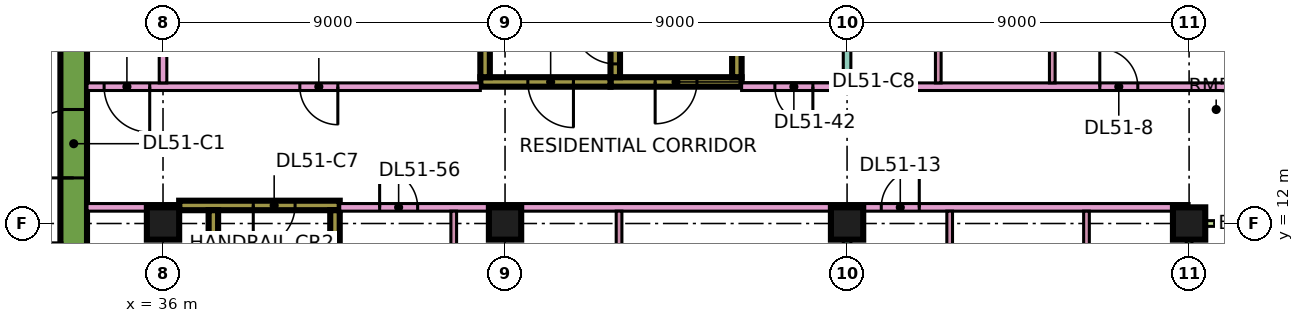
"""IFC4 building model, lengths in metres.
Left out: names, types, materials, properties, quantities, classifications, styles, units other than length and angle.
Written with IfcOpenShell. Run it as: python <this file> out.ifc"""

import sys

from ifc_helpers import new_model, si_unit, direction, frame, frame_2d, origin, origin_2d, place, context, subcontext, project, spatial, rectangle, extrude, element, fill, save


model = new_model("IFC4")
c1 = context("Model", 3, precision=1e-05, world=origin(), true_north=direction((0.0, 1.0)))
c2 = subcontext(c1, "Body", "Model", "MODEL_VIEW")
j1 = project(units=[si_unit("LENGTHUNIT", "METRE"), si_unit("PLANEANGLEUNIT", "RADIAN")], contexts=[c1])
p1 = place(None, origin())
s1 = spatial("IfcSite", under=j1, at=p1, CompositionType="ELEMENT")
p2 = place(p1, origin())
s2 = spatial("IfcBuilding", under=s1, at=p2, CompositionType="ELEMENT")
p3 = place(p2, frame((0.0, 0.0, 219.15)))
s3 = spatial("IfcBuildingStorey", under=s2, at=p3, CompositionType="ELEMENT", Elevation=219.15)
for number, where, z_axis, x_axis in (
    (1, (36.0, 12.0, 0.0), (0.0, 0.0, 1.0), (1.0, 0.0, 0.0)),
    (2, (45.0, 12.0, 0.0), (0.0, 0.0, 1.0), (1.0, 0.0, 0.0)),
    (3, (54.0, 12.0, 0.0), (0.0, 0.0, 1.0), (1.0, 0.0, 0.0)),
    (4, (63.0, 12.0, 0.0), (0.0, 0.0, 1.0), (1.0, 0.0, 0.0)),
):
    element("IfcColumn", number, at=place(p3, frame(where, z_axis=z_axis, x_axis=x_axis)), inside=s3, PredefinedType="COLUMN", context=c2, shape_type="SweptSolid", body=[
        extrude(rectangle(XDim=0.85, YDim=0.85, at=origin_2d()), origin(), (0.0, 0.0, 1.0), 3.75),
    ])
p4 = place(p3, frame((33.65, 7.7, 0.0), z_axis=(0.0, 0.0, 1.0), x_axis=(0.0, 1.0, 0.0)))
e5 = element("IfcWall", 5, at=p4, inside=s3, PredefinedType="SHEAR", context=c2, shape_type="SweptSolid", body=[
    extrude(rectangle(XDim=11.6, YDim=0.7, at=frame_2d((5.8, 0.0))), origin(), (0.0, 0.0, 1.0), 3.75),
])
p5 = place(p4, frame((5.5, 0.0, 0.0)))
e6 = element("IfcOpeningElement", 6, at=p5, cuts=e5, PredefinedType="OPENING", context=c2, shape_type="SweptSolid", body=[
    extrude(rectangle(XDim=1.8, YDim=2.4, at=frame_2d((0.9, 1.2))), frame((0.0, 0.36, 0.0), z_axis=(0.0, -1.0, 0.0), x_axis=(1.0, 0.0, 0.0)), (0.0, 0.0, 1.0), 0.72),
])
p6 = place(p3, frame((36.425, 12.475, 0.0), z_axis=(0.0, 0.0, 1.0), x_axis=(1.0, 0.0, 0.0)))
e7 = element("IfcWall", 7, at=p6, inside=s3, PredefinedType="SHEAR", context=c2, shape_type="SweptSolid", body=[
    extrude(rectangle(XDim=4.225, YDim=0.25, at=frame_2d((2.112, 0.0))), origin(), (0.0, 0.0, 1.0), 3.75),
])
p7 = place(p6, frame((1.95, 0.0, 0.0)))
e8 = element("IfcOpeningElement", 8, at=p7, cuts=e7, PredefinedType="OPENING", context=c2, shape_type="SweptSolid", body=[
    extrude(rectangle(XDim=1.1, YDim=2.2, at=frame_2d((0.55, 1.1))), frame((0.0, 0.135, 0.0), z_axis=(0.0, -1.0, 0.0), x_axis=(1.0, 0.0, 0.0)), (0.0, 0.0, 1.0), 0.27),
])
for number, where, z_axis, x_axis in (
    (9, (37.325, 5.85, 0.0), (0.0, 0.0, 1.0), (0.0, 1.0, 0.0)),
    (10, (40.525, 5.85, 0.0), (0.0, 0.0, 1.0), (0.0, 1.0, 0.0)),
):
    element("IfcWall", number, at=place(p3, frame(where, z_axis=z_axis, x_axis=x_axis)), inside=s3, PredefinedType="SHEAR", context=c2, shape_type="SweptSolid", body=[
        extrude(rectangle(XDim=6.5, YDim=0.25, at=frame_2d((3.25, 0.0))), origin(), (0.0, 0.0, 1.0), 3.75),
    ])
p8 = place(p3, frame((47.775, 15.725, 0.0), z_axis=(0.0, 0.0, 1.0), x_axis=(1.0, 0.0, 0.0)))
e11 = element("IfcWall", 11, at=p8, inside=s3, PredefinedType="SHEAR", context=c2, shape_type="SweptSolid", body=[
    extrude(rectangle(XDim=3.45, YDim=0.25, at=frame_2d((1.725, 0.0))), origin(), (0.0, 0.0, 1.0), 3.75),
])
p9 = place(p8, frame((1.175, 0.0, 0.0)))
e12 = element("IfcOpeningElement", 12, at=p9, cuts=e11, PredefinedType="OPENING", context=c2, shape_type="SweptSolid", body=[
    extrude(rectangle(XDim=1.1, YDim=2.2, at=frame_2d((0.55, 1.1))), frame((0.0, 0.135, 0.0), z_axis=(0.0, -1.0, 0.0), x_axis=(1.0, 0.0, 0.0)), (0.0, 0.0, 1.0), 0.27),
])
p10 = place(p3, frame((47.9, 15.85, 0.0), z_axis=(0.0, 0.0, 1.0), x_axis=(0.0, 1.0, 0.0)))
e13 = element("IfcWall", 13, at=p10, inside=s3, PredefinedType="SHEAR", context=c2, shape_type="SweptSolid", body=[
    extrude(rectangle(XDim=6.5, YDim=0.25, at=frame_2d((3.25, 0.0))), origin(), (0.0, 0.0, 1.0), 3.75),
])
p11 = place(p10, frame((0.35, 0.0, 0.0)))
e14 = element("IfcOpeningElement", 14, at=p11, cuts=e13, PredefinedType="OPENING", context=c2, shape_type="SweptSolid", body=[
    extrude(rectangle(XDim=1.1, YDim=2.2, at=frame_2d((0.55, 1.1))), frame((0.0, 0.135, 0.0), z_axis=(0.0, -1.0, 0.0), x_axis=(1.0, 0.0, 0.0)), (0.0, 0.0, 1.0), 0.27),
])
p12 = place(p3, frame((51.1, 15.85, 0.0), z_axis=(0.0, 0.0, 1.0), x_axis=(0.0, 1.0, 0.0)))
e15 = element("IfcWall", 15, at=p12, inside=s3, PredefinedType="SHEAR", context=c2, shape_type="SweptSolid", body=[
    extrude(rectangle(XDim=6.5, YDim=0.25, at=frame_2d((3.25, 0.0))), origin(), (0.0, 0.0, 1.0), 3.75),
])
p13 = place(p3, frame((44.35, 15.725, 0.0), z_axis=(0.0, 0.0, 1.0), x_axis=(1.0, 0.0, 0.0)))
e16 = element("IfcWall", 16, at=p13, inside=s3, PredefinedType="SHEAR", context=c2, shape_type="SweptSolid", body=[
    extrude(rectangle(XDim=3.425, YDim=0.25, at=frame_2d((1.712, 0.0))), origin(), (0.0, 0.0, 1.0), 3.75),
])
p14 = place(p13, frame((1.25, 0.0, 0.0)))
e17 = element("IfcOpeningElement", 17, at=p14, cuts=e16, PredefinedType="OPENING", context=c2, shape_type="SweptSolid", body=[
    extrude(rectangle(XDim=1.2, YDim=2.2, at=frame_2d((0.6, 1.1))), frame((0.0, 0.135, 0.0), z_axis=(0.0, -1.0, 0.0), x_axis=(1.0, 0.0, 0.0)), (0.0, 0.0, 1.0), 0.27),
])
p15 = place(p3, frame((44.475, 15.85, 0.0), z_axis=(0.0, 0.0, 1.0), x_axis=(0.0, 1.0, 0.0)))
e18 = element("IfcWall", 18, at=p15, inside=s3, PredefinedType="SHEAR", context=c2, shape_type="SweptSolid", body=[
    extrude(rectangle(XDim=6.5, YDim=0.25, at=frame_2d((3.25, 0.0))), origin(), (0.0, 0.0, 1.0), 3.75),
])
p16 = place(p15, frame((1.75, 0.0, 0.0)))
e19 = element("IfcOpeningElement", 19, at=p16, cuts=e18, PredefinedType="OPENING", context=c2, shape_type="SweptSolid", body=[
    extrude(rectangle(XDim=1.1, YDim=2.2, at=frame_2d((0.55, 1.1))), frame((0.0, 0.135, 0.0), z_axis=(0.0, -1.0, 0.0), x_axis=(1.0, 0.0, 0.0)), (0.0, 0.0, 1.0), 0.27),
])
p17 = place(p15, frame((4.3, 0.0, 0.0)))
e20 = element("IfcOpeningElement", 20, at=p17, cuts=e18, PredefinedType="OPENING", context=c2, shape_type="SweptSolid", body=[
    extrude(rectangle(XDim=1.1, YDim=2.2, at=frame_2d((0.55, 1.1))), frame((0.0, 0.135, 0.0), z_axis=(0.0, -1.0, 0.0), x_axis=(1.0, 0.0, 0.0)), (0.0, 0.0, 1.0), 0.27),
])
p18 = place(p3, frame((63.0, 1.575, 0.0), z_axis=(0.0, 0.0, 1.0), x_axis=(0.0, 1.0, 0.0)))
e21 = element("IfcWall", 21, at=p18, inside=s3, PredefinedType="SOLIDWALL", context=c2, shape_type="SweptSolid", body=[
    extrude(rectangle(XDim=10.35, YDim=0.15, at=frame_2d((5.175, 0.0))), origin(), (0.0, 0.0, 1.0), 3.35),
])
p19 = place(p18, frame((1.825, 0.0, 0.0)))
e22 = element("IfcOpeningElement", 22, at=p19, cuts=e21, PredefinedType="OPENING", context=c2, shape_type="SweptSolid", body=[
    extrude(rectangle(XDim=1.8, YDim=2.4, at=frame_2d((0.9, 1.2))), frame((0.0, 0.085, 0.0), z_axis=(0.0, -1.0, 0.0), x_axis=(1.0, 0.0, 0.0)), (0.0, 0.0, 1.0), 0.17),
])
p20 = place(p18, frame((7.075, 0.0, 0.45)))
e23 = element("IfcOpeningElement", 23, at=p20, cuts=e21, PredefinedType="OPENING", context=c2, shape_type="SweptSolid", body=[
    extrude(rectangle(XDim=2.4, YDim=2.4, at=frame_2d((1.2, 1.2))), frame((0.0, 0.085, 0.0), z_axis=(0.0, -1.0, 0.0), x_axis=(1.0, 0.0, 0.0)), (0.0, 0.0, 1.0), 0.17),
])
p21 = place(p3, frame((64.5, 12.0, 0.0), z_axis=(0.0, 0.0, 1.0), x_axis=(-1.0, 0.0, 0.0)))
e24 = element("IfcWall", 24, at=p21, inside=s3, PredefinedType="SOLIDWALL", context=c2, shape_type="SweptSolid", body=[
    extrude(rectangle(XDim=1.5, YDim=0.15, at=frame_2d((0.75, 0.0))), origin(), (0.0, 0.0, 1.0), 3.35),
])
p22 = place(p3, frame((34.0, 12.425, 0.0), z_axis=(0.0, 0.0, 1.0), x_axis=(1.0, 0.0, 0.0)))
e25 = element("IfcWall", 25, at=p22, inside=s3, PredefinedType="PARTITIONING", context=c2, shape_type="SweptSolid", body=[
    extrude(rectangle(XDim=2.426, YDim=0.2, at=frame_2d((1.213, 0.0))), origin(), (0.0, 0.0, 1.0), 3.35),
])
p23 = place(p3, frame((34.0, 15.6, 0.0), z_axis=(0.0, 0.0, 1.0), x_axis=(1.0, 0.0, 0.0)))
e26 = element("IfcWall", 26, at=p23, inside=s3, PredefinedType="PARTITIONING", context=c2, shape_type="SweptSolid", body=[
    extrude(rectangle(XDim=10.35, YDim=0.2, at=frame_2d((5.175, 0.0))), origin(), (0.0, 0.0, 1.0), 3.35),
])
p24 = place(p23, frame((5.6, 0.0, 0.0)))
e27 = element("IfcOpeningElement", 27, at=p24, cuts=e26, PredefinedType="OPENING", context=c2, shape_type="SweptSolid", body=[
    extrude(rectangle(XDim=1.0, YDim=2.1, at=frame_2d((0.5, 1.05))), frame((0.0, 0.11, 0.0), z_axis=(0.0, -1.0, 0.0), x_axis=(1.0, 0.0, 0.0)), (0.0, 0.0, 1.0), 0.22),
])
p25 = place(p23, frame((0.45, 0.0, 0.0)))
e28 = element("IfcOpeningElement", 28, at=p25, cuts=e26, PredefinedType="OPENING", context=c2, shape_type="SweptSolid", body=[
    extrude(rectangle(XDim=1.2, YDim=2.1, at=frame_2d((0.6, 1.05))), frame((0.0, 0.11, 0.0), z_axis=(0.0, -1.0, 0.0), x_axis=(1.0, 0.0, 0.0)), (0.0, 0.0, 1.0), 0.22),
])
p26 = place(p3, frame((36.0, 15.7, 0.0), z_axis=(0.0, 0.0, 1.0), x_axis=(0.0, 1.0, 0.0)))
e29 = element("IfcWall", 29, at=p26, inside=s3, PredefinedType="PARTITIONING", context=c2, shape_type="SweptSolid", body=[
    extrude(rectangle(XDim=8.3, YDim=0.2, at=frame_2d((4.15, 0.0))), origin(), (0.0, 0.0, 1.0), 3.35),
])
p27 = place(p3, frame((40.65, 12.425, 0.0), z_axis=(0.0, 0.0, 1.0), x_axis=(1.0, 0.0, 0.0)))
e30 = element("IfcWall", 30, at=p27, inside=s3, PredefinedType="PARTITIONING", context=c2, shape_type="SweptSolid", body=[
    extrude(rectangle(XDim=22.35, YDim=0.2, at=frame_2d((11.175, 0.0))), origin(), (0.0, 0.0, 1.0), 3.35),
])
p28 = place(p27, frame((14.25, 0.0, 0.0)))
e31 = element("IfcOpeningElement", 31, at=p28, cuts=e30, PredefinedType="OPENING", context=c2, shape_type="SweptSolid", body=[
    extrude(rectangle(XDim=1.0, YDim=2.1, at=frame_2d((0.5, 1.05))), frame((0.0, 0.11, 0.0), z_axis=(0.0, -1.0, 0.0), x_axis=(1.0, 0.0, 0.0)), (0.0, 0.0, 1.0), 0.22),
])
p29 = place(p27, frame((1.05, 0.0, 0.0)))
e32 = element("IfcOpeningElement", 32, at=p29, cuts=e30, PredefinedType="OPENING", context=c2, shape_type="SweptSolid", body=[
    extrude(rectangle(XDim=1.0, YDim=2.1, at=frame_2d((0.5, 1.05))), frame((0.0, 0.11, 0.0), z_axis=(0.0, -1.0, 0.0), x_axis=(1.0, 0.0, 0.0)), (0.0, 0.0, 1.0), 0.22),
])
p30 = place(p3, frame((43.65, 5.975, 0.0), z_axis=(0.0, 0.0, 1.0), x_axis=(0.0, 1.0, 0.0)))
e33 = element("IfcWall", 33, at=p30, inside=s3, PredefinedType="PARTITIONING", context=c2, shape_type="SweptSolid", body=[
    extrude(rectangle(XDim=6.35, YDim=0.15, at=frame_2d((3.175, 0.0))), origin(), (0.0, 0.0, 1.0), 3.35),
])
p31 = place(p30, frame((4.275, 0.0, 0.0)))
e34 = element("IfcOpeningElement", 34, at=p31, cuts=e33, PredefinedType="OPENING", context=c2, shape_type="SweptSolid", body=[
    extrude(rectangle(XDim=0.9, YDim=2.1, at=frame_2d((0.45, 1.05))), frame((0.0, 0.085, 0.0), z_axis=(0.0, -1.0, 0.0), x_axis=(1.0, 0.0, 0.0)), (0.0, 0.0, 1.0), 0.17),
])
p32 = place(p3, frame((48.0, 5.975, 0.0), z_axis=(0.0, 0.0, 1.0), x_axis=(0.0, 1.0, 0.0)))
e35 = element("IfcWall", 35, at=p32, inside=s3, PredefinedType="PARTITIONING", context=c2, shape_type="SweptSolid", body=[
    extrude(rectangle(XDim=6.35, YDim=0.15, at=frame_2d((3.175, 0.0))), origin(), (0.0, 0.0, 1.0), 3.35),
])
p33 = place(p3, frame((51.225, 15.6, 0.0), z_axis=(0.0, 0.0, 1.0), x_axis=(1.0, 0.0, 0.0)))
e36 = element("IfcWall", 36, at=p33, inside=s3, PredefinedType="PARTITIONING", context=c2, shape_type="SweptSolid", body=[
    extrude(rectangle(XDim=13.125, YDim=0.2, at=frame_2d((6.562, 0.0))), origin(), (0.0, 0.0, 1.0), 3.35),
])
p34 = place(p33, frame((9.425, 0.0, 0.0)))
e37 = element("IfcOpeningElement", 37, at=p34, cuts=e36, PredefinedType="OPENING", context=c2, shape_type="SweptSolid", body=[
    extrude(rectangle(XDim=1.0, YDim=2.1, at=frame_2d((0.5, 1.05))), frame((0.0, 0.11, 0.0), z_axis=(0.0, -1.0, 0.0), x_axis=(1.0, 0.0, 0.0)), (0.0, 0.0, 1.0), 0.22),
])
p35 = place(p33, frame((0.875, 0.0, 0.0)))
e38 = element("IfcOpeningElement", 38, at=p35, cuts=e36, PredefinedType="OPENING", context=c2, shape_type="SweptSolid", body=[
    extrude(rectangle(XDim=1.0, YDim=2.1, at=frame_2d((0.5, 1.05))), frame((0.0, 0.11, 0.0), z_axis=(0.0, -1.0, 0.0), x_axis=(1.0, 0.0, 0.0)), (0.0, 0.0, 1.0), 0.22),
])
p36 = place(p3, frame((54.0, 0.074, 0.0), z_axis=(0.0, 0.0, 1.0), x_axis=(0.0, 1.0, 0.0)))
e39 = element("IfcWall", 39, at=p36, inside=s3, PredefinedType="PARTITIONING", context=c2, shape_type="SweptSolid", body=[
    extrude(rectangle(XDim=12.251, YDim=0.2, at=frame_2d((6.125, 0.0))), origin(), (0.0, 0.0, 1.0), 3.35),
])
p37 = place(p3, frame((54.0, 15.7, 0.0), z_axis=(0.0, 0.0, 1.0), x_axis=(0.0, 1.0, 0.0)))
e40 = element("IfcWall", 40, at=p37, inside=s3, PredefinedType="PARTITIONING", context=c2, shape_type="SweptSolid", body=[
    extrude(rectangle(XDim=8.226, YDim=0.2, at=frame_2d((4.113, 0.0))), origin(), (0.0, 0.0, 1.0), 3.35),
])
p38 = place(p3, frame((56.4, 15.7, 0.0), z_axis=(0.0, 0.0, 1.0), x_axis=(0.0, 1.0, 0.0)))
e41 = element("IfcWall", 41, at=p38, inside=s3, PredefinedType="PARTITIONING", context=c2, shape_type="SweptSolid", body=[
    extrude(rectangle(XDim=3.125, YDim=0.15, at=frame_2d((1.562, 0.0))), origin(), (0.0, 0.0, 1.0), 3.35),
])
p39 = place(p3, frame((56.7, 8.3, 0.0), z_axis=(0.0, 0.0, 1.0), x_axis=(0.0, 1.0, 0.0)))
e42 = element("IfcWall", 42, at=p39, inside=s3, PredefinedType="PARTITIONING", context=c2, shape_type="SweptSolid", body=[
    extrude(rectangle(XDim=4.025, YDim=0.15, at=frame_2d((2.012, 0.0))), origin(), (0.0, 0.0, 1.0), 3.35),
])
p40 = place(p3, frame((59.4, 15.7, 0.0), z_axis=(0.0, 0.0, 1.0), x_axis=(0.0, 1.0, 0.0)))
e43 = element("IfcWall", 43, at=p40, inside=s3, PredefinedType="PARTITIONING", context=c2, shape_type="SweptSolid", body=[
    extrude(rectangle(XDim=3.125, YDim=0.15, at=frame_2d((1.562, 0.0))), origin(), (0.0, 0.0, 1.0), 3.35),
])
p41 = place(p40, frame((1.2, 0.0, 0.0)))
e44 = element("IfcOpeningElement", 44, at=p41, cuts=e43, PredefinedType="OPENING", context=c2, shape_type="SweptSolid", body=[
    extrude(rectangle(XDim=0.8, YDim=2.1, at=frame_2d((0.4, 1.05))), frame((0.0, 0.085, 0.0), z_axis=(0.0, -1.0, 0.0), x_axis=(1.0, 0.0, 0.0)), (0.0, 0.0, 1.0), 0.17),
])
p42 = place(p3, frame((60.3, 8.3, 0.0), z_axis=(0.0, 0.0, 1.0), x_axis=(0.0, 1.0, 0.0)))
e45 = element("IfcWall", 45, at=p42, inside=s3, PredefinedType="PARTITIONING", context=c2, shape_type="SweptSolid", body=[
    extrude(rectangle(XDim=4.025, YDim=0.15, at=frame_2d((2.012, 0.0))), origin(), (0.0, 0.0, 1.0), 3.35),
])
p43 = place(p5, origin())
e46 = element("IfcDoor", 46, at=p43, inside=s3, OperationType="DOUBLE_DOOR_SINGLE_SWING", PredefinedType="DOOR", context=c2, shape_type="SweptSolid", body=[
    extrude(rectangle(XDim=1.8, YDim=2.4, at=frame_2d((0.9, 1.2))), frame((0.0, 0.025, 0.0), z_axis=(0.0, -1.0, 0.0), x_axis=(1.0, 0.0, 0.0)), (0.0, 0.0, 1.0), 0.05),
])
fill(e6, e46)
p44 = place(p7, frame((1.1, 0.0, 0.0), z_axis=(0.0, 0.0, 1.0), x_axis=(-1.0, 0.0, 0.0)))
e47 = element("IfcDoor", 47, at=p44, inside=s3, OperationType="SINGLE_SWING_LEFT", PredefinedType="DOOR", context=c2, shape_type="SweptSolid", body=[
    extrude(rectangle(XDim=1.1, YDim=2.2, at=frame_2d((0.55, 1.1))), frame((0.0, 0.025, 0.0), z_axis=(0.0, -1.0, 0.0), x_axis=(1.0, 0.0, 0.0)), (0.0, 0.0, 1.0), 0.05),
])
fill(e8, e47)
p45 = place(p9, frame((1.1, 0.0, 0.0), z_axis=(0.0, 0.0, 1.0), x_axis=(-1.0, 0.0, 0.0)))
e48 = element("IfcDoor", 48, at=p45, inside=s3, OperationType="SINGLE_SWING_LEFT", PredefinedType="DOOR", context=c2, shape_type="SweptSolid", body=[
    extrude(rectangle(XDim=1.1, YDim=2.2, at=frame_2d((0.55, 1.1))), frame((0.0, 0.025, 0.0), z_axis=(0.0, -1.0, 0.0), x_axis=(1.0, 0.0, 0.0)), (0.0, 0.0, 1.0), 0.05),
])
fill(e12, e48)
p46 = place(p14, origin())
e49 = element("IfcDoor", 49, at=p46, inside=s3, OperationType="SINGLE_SWING_RIGHT", PredefinedType="DOOR", context=c2, shape_type="SweptSolid", body=[
    extrude(rectangle(XDim=1.2, YDim=2.2, at=frame_2d((0.6, 1.1))), frame((0.0, 0.025, 0.0), z_axis=(0.0, -1.0, 0.0), x_axis=(1.0, 0.0, 0.0)), (0.0, 0.0, 1.0), 0.05),
])
fill(e17, e49)
p47 = place(p11, frame((1.1, 0.0, 0.0), z_axis=(0.0, 0.0, 1.0), x_axis=(-1.0, 0.0, 0.0)))
e50 = element("IfcDoor", 50, at=p47, inside=s3, OperationType="SINGLE_SWING_RIGHT", PredefinedType="DOOR", context=c2, shape_type="SweptSolid", body=[
    extrude(rectangle(XDim=1.1, YDim=2.2, at=frame_2d((0.55, 1.1))), frame((0.0, 0.025, 0.0), z_axis=(0.0, -1.0, 0.0), x_axis=(1.0, 0.0, 0.0)), (0.0, 0.0, 1.0), 0.05),
])
fill(e14, e50)
p48 = place(p24, origin())
e51 = element("IfcDoor", 51, at=p48, inside=s3, OperationType="SINGLE_SWING_RIGHT", PredefinedType="DOOR", context=c2, shape_type="SweptSolid", body=[
    extrude(rectangle(XDim=1.0, YDim=2.1, at=frame_2d((0.5, 1.05))), frame((0.0, 0.025, 0.0), z_axis=(0.0, -1.0, 0.0), x_axis=(1.0, 0.0, 0.0)), (0.0, 0.0, 1.0), 0.05),
])
fill(e27, e51)
p49 = place(p34, origin())
e52 = element("IfcDoor", 52, at=p49, inside=s3, OperationType="SINGLE_SWING_LEFT", PredefinedType="DOOR", context=c2, shape_type="SweptSolid", body=[
    extrude(rectangle(XDim=1.0, YDim=2.1, at=frame_2d((0.5, 1.05))), frame((0.0, 0.025, 0.0), z_axis=(0.0, -1.0, 0.0), x_axis=(1.0, 0.0, 0.0)), (0.0, 0.0, 1.0), 0.05),
])
fill(e37, e52)
p50 = place(p28, frame((1.0, 0.0, 0.0), z_axis=(0.0, 0.0, 1.0), x_axis=(-1.0, 0.0, 0.0)))
e53 = element("IfcDoor", 53, at=p50, inside=s3, OperationType="SINGLE_SWING_RIGHT", PredefinedType="DOOR", context=c2, shape_type="SweptSolid", body=[
    extrude(rectangle(XDim=1.0, YDim=2.1, at=frame_2d((0.5, 1.05))), frame((0.0, 0.025, 0.0), z_axis=(0.0, -1.0, 0.0), x_axis=(1.0, 0.0, 0.0)), (0.0, 0.0, 1.0), 0.05),
])
fill(e31, e53)
p51 = place(p25, origin())
e54 = element("IfcDoor", 54, at=p51, inside=s3, OperationType="SINGLE_SWING_RIGHT", PredefinedType="DOOR", context=c2, shape_type="SweptSolid", body=[
    extrude(rectangle(XDim=1.2, YDim=2.1, at=frame_2d((0.6, 1.05))), frame((0.0, 0.025, 0.0), z_axis=(0.0, -1.0, 0.0), x_axis=(1.0, 0.0, 0.0)), (0.0, 0.0, 1.0), 0.05),
])
fill(e28, e54)
p52 = place(p35, origin())
e55 = element("IfcDoor", 55, at=p52, inside=s3, OperationType="SINGLE_SWING_RIGHT", PredefinedType="DOOR", context=c2, shape_type="SweptSolid", body=[
    extrude(rectangle(XDim=1.0, YDim=2.1, at=frame_2d((0.5, 1.05))), frame((0.0, 0.025, 0.0), z_axis=(0.0, -1.0, 0.0), x_axis=(1.0, 0.0, 0.0)), (0.0, 0.0, 1.0), 0.05),
])
fill(e38, e55)
p53 = place(p29, origin())
e56 = element("IfcDoor", 56, at=p53, inside=s3, OperationType="SINGLE_SWING_LEFT", PredefinedType="DOOR", context=c2, shape_type="SweptSolid", body=[
    extrude(rectangle(XDim=1.0, YDim=2.1, at=frame_2d((0.5, 1.05))), frame((0.0, 0.025, 0.0), z_axis=(0.0, -1.0, 0.0), x_axis=(1.0, 0.0, 0.0)), (0.0, 0.0, 1.0), 0.05),
])
fill(e32, e56)
save(model, sys.argv[1])
